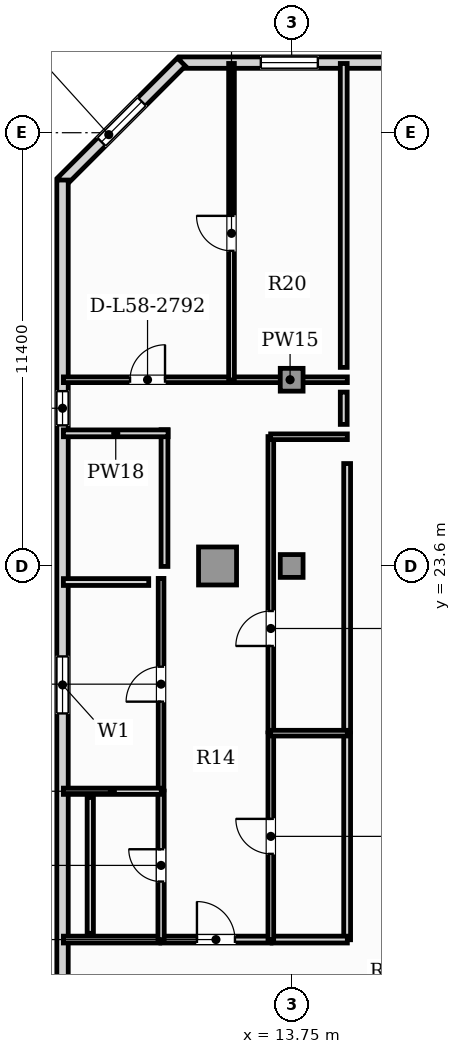
"""IFC4 building model, lengths in metres.
Left out: names, types, materials, properties, quantities, classifications, styles, units other than length and angle.
Written with IfcOpenShell. Run it as: python <this file> out.ifc"""

import sys

from ifc_helpers import new_model, si_unit, direction, frame, frame_2d, origin, origin_2d, place, context, subcontext, project, spatial, rectangle, hollow_rectangle, extrude, element, fill, save


model = new_model("IFC4")
c1 = context("Model", 3, precision=1e-05, world=origin(), true_north=direction((0.0, 1.0)))
c2 = subcontext(c1, "Body", "Model", "MODEL_VIEW")
j1 = project(units=[si_unit("LENGTHUNIT", "METRE"), si_unit("PLANEANGLEUNIT", "RADIAN")], contexts=[c1])
p1 = place(None, origin())
s1 = spatial("IfcSite", under=j1, at=p1, CompositionType="ELEMENT")
p2 = place(p1, origin())
s2 = spatial("IfcBuilding", under=s1, at=p2, CompositionType="ELEMENT")
p3 = place(p2, frame((0.0, 0.0, 234.95)))
s3 = spatial("IfcBuildingStorey", under=s2, at=p3, CompositionType="ELEMENT", Elevation=234.95)
p4 = place(p3, frame((11.8, 23.6, 0.0), z_axis=(0.0, 0.0, 1.0), x_axis=(1.0, 0.0, 0.0)))
e1 = element("IfcColumn", 1, at=p4, inside=s3, PredefinedType="USERDEFINED", context=c2, shape_type="SweptSolid", body=[
    extrude(hollow_rectangle(XDim=1.0, YDim=1.0, WallThickness=0.06, at=origin_2d()), origin(), (0.0, 0.0, 1.0), 3.85),
])
for number, where, z_axis, x_axis in (
    (2, (13.75, 23.6, 0.0), (0.0, 0.0, 1.0), (1.0, 0.0, 0.0)),
    (3, (13.75, 28.5, 0.0), (0.0, 0.0, 1.0), (1.0, 0.0, 0.0)),
):
    element("IfcColumn", number, at=place(p3, frame(where, z_axis=z_axis, x_axis=x_axis)), inside=s3, PredefinedType="COLUMN", context=c2, shape_type="SweptSolid", body=[
        extrude(rectangle(XDim=0.6, YDim=0.6, at=origin_2d()), origin(), (0.0, 0.0, 1.0), 3.85),
    ])
p5 = place(p3, frame((46.689, 36.844, 0.0), z_axis=(0.0, 0.0, 1.0), x_axis=(-1.0, 0.0, 0.0)))
e4 = element("IfcWall", 4, at=p5, inside=s3, PredefinedType="SOLIDWALL", context=c2, shape_type="SweptSolid", body=[
    extrude(rectangle(XDim=35.878, YDim=0.3, at=frame_2d((17.939, 0.0))), origin(), (0.0, 0.0, 1.0), 3.63),
])
p6 = place(p5, frame((32.25, 0.0, 0.9)))
e5 = element("IfcOpeningElement", 5, at=p6, cuts=e4, PredefinedType="OPENING", context=c2, shape_type="SweptSolid", body=[
    extrude(rectangle(XDim=1.5, YDim=1.95, at=frame_2d((0.75, 0.975))), frame((0.0, 0.16, 0.0), z_axis=(0.0, -1.0, 0.0), x_axis=(1.0, 0.0, 0.0)), (0.0, 0.0, 1.0), 0.32),
])
p7 = place(p5, frame((27.205, 0.0, 0.9)))
e6 = element("IfcOpeningElement", 6, at=p7, cuts=e4, PredefinedType="OPENING", context=c2, shape_type="SweptSolid", body=[
    extrude(rectangle(XDim=0.9, YDim=1.4, at=frame_2d((0.45, 0.7))), frame((0.0, 0.16, 0.0), z_axis=(0.0, -1.0, 0.0), x_axis=(1.0, 0.0, 0.0)), (0.0, 0.0, 1.0), 0.32),
])
p8 = place(p5, frame((22.89, 0.0, 0.9)))
e7 = element("IfcOpeningElement", 7, at=p8, cuts=e4, PredefinedType="OPENING", context=c2, shape_type="SweptSolid", body=[
    extrude(rectangle(XDim=1.5, YDim=1.95, at=frame_2d((0.75, 0.975))), frame((0.0, 0.16, 0.0), z_axis=(0.0, -1.0, 0.0), x_axis=(1.0, 0.0, 0.0)), (0.0, 0.0, 1.0), 0.32),
])
p9 = place(p5, frame((19.14, 0.0, 0.9)))
e8 = element("IfcOpeningElement", 8, at=p9, cuts=e4, PredefinedType="OPENING", context=c2, shape_type="SweptSolid", body=[
    extrude(rectangle(XDim=1.5, YDim=1.95, at=frame_2d((0.75, 0.975))), frame((0.0, 0.16, 0.0), z_axis=(0.0, -1.0, 0.0), x_axis=(1.0, 0.0, 0.0)), (0.0, 0.0, 1.0), 0.32),
])
p10 = place(p5, frame((15.216, 0.0, 0.9)))
e9 = element("IfcOpeningElement", 9, at=p10, cuts=e4, PredefinedType="OPENING", context=c2, shape_type="SweptSolid", body=[
    extrude(rectangle(XDim=1.5, YDim=1.95, at=frame_2d((0.75, 0.975))), frame((0.0, 0.16, 0.0), z_axis=(0.0, -1.0, 0.0), x_axis=(1.0, 0.0, 0.0)), (0.0, 0.0, 1.0), 0.32),
])
p11 = place(p5, frame((10.82, 0.0, 0.9)))
e10 = element("IfcOpeningElement", 10, at=p11, cuts=e4, PredefinedType="OPENING", context=c2, shape_type="SweptSolid", body=[
    extrude(rectangle(XDim=1.5, YDim=1.95, at=frame_2d((0.75, 0.975))), frame((0.0, 0.16, 0.0), z_axis=(0.0, -1.0, 0.0), x_axis=(1.0, 0.0, 0.0)), (0.0, 0.0, 1.0), 0.32),
])
p12 = place(p5, frame((6.463, 0.0, 0.9)))
e11 = element("IfcOpeningElement", 11, at=p12, cuts=e4, PredefinedType="OPENING", context=c2, shape_type="SweptSolid", body=[
    extrude(rectangle(XDim=1.5, YDim=1.95, at=frame_2d((0.75, 0.975))), frame((0.0, 0.16, 0.0), z_axis=(0.0, -1.0, 0.0), x_axis=(1.0, 0.0, 0.0)), (0.0, 0.0, 1.0), 0.32),
])
p13 = place(p5, frame((2.721, 0.0, 0.9)))
e12 = element("IfcOpeningElement", 12, at=p13, cuts=e4, PredefinedType="OPENING", context=c2, shape_type="SweptSolid", body=[
    extrude(rectangle(XDim=1.5, YDim=1.95, at=frame_2d((0.75, 0.975))), frame((0.0, 0.16, 0.0), z_axis=(0.0, -1.0, 0.0), x_axis=(1.0, 0.0, 0.0)), (0.0, 0.0, 1.0), 0.32),
])
p14 = place(p3, frame((10.849, 36.86, 0.0), z_axis=(0.0, 0.0, 1.0), x_axis=(-0.707079321262, -0.707134240044, 0.0)))
e13 = element("IfcWall", 13, at=p14, inside=s3, PredefinedType="SOLIDWALL", context=c2, shape_type="SweptSolid", body=[
    extrude(rectangle(XDim=4.446, YDim=0.3, at=frame_2d((2.223, 0.0))), origin(), (0.0, 0.0, 1.0), 3.63),
])
p15 = place(p14, frame((1.473, 0.0, 0.9)))
e14 = element("IfcOpeningElement", 14, at=p15, cuts=e13, PredefinedType="OPENING", context=c2, shape_type="SweptSolid", body=[
    extrude(rectangle(XDim=1.5, YDim=1.95, at=frame_2d((0.75, 0.975))), frame((0.0, 0.16, 0.0), z_axis=(0.0, -1.0, 0.0), x_axis=(1.0, 0.0, 0.0)), (0.0, 0.0, 1.0), 0.32),
])
p16 = place(p3, frame((7.721, 33.754, 0.0), z_axis=(0.0, 0.0, 1.0), x_axis=(0.0, -1.0, 0.0)))
e15 = element("IfcWall", 15, at=p16, inside=s3, PredefinedType="SOLIDWALL", context=c2, shape_type="SweptSolid", body=[
    extrude(rectangle(XDim=30.514, YDim=0.3, at=frame_2d((15.257, 0.0))), origin(), (0.0, 0.0, 1.0), 3.63),
])
p17 = place(p16, frame((5.554, 0.0, 0.95)))
e16 = element("IfcOpeningElement", 16, at=p17, cuts=e15, PredefinedType="OPENING", context=c2, shape_type="SweptSolid", body=[
    extrude(rectangle(XDim=0.9, YDim=1.5, at=frame_2d((0.45, 0.75))), frame((0.0, 0.16, 0.0), z_axis=(0.0, -1.0, 0.0), x_axis=(1.0, 0.0, 0.0)), (0.0, 0.0, 1.0), 0.32),
])
p18 = place(p16, frame((12.534, 0.0, 0.9)))
e17 = element("IfcOpeningElement", 17, at=p18, cuts=e15, PredefinedType="OPENING", context=c2, shape_type="SweptSolid", body=[
    extrude(rectangle(XDim=1.5, YDim=1.95, at=frame_2d((0.75, 0.975))), frame((0.0, 0.16, 0.0), z_axis=(0.0, -1.0, 0.0), x_axis=(1.0, 0.0, 0.0)), (0.0, 0.0, 1.0), 0.32),
])
p19 = place(p3, frame((10.309, 13.77, 0.0), z_axis=(0.0, 0.0, 1.0), x_axis=(1.0, 0.0, 0.0)))
e18 = element("IfcWall", 18, at=p19, inside=s3, PredefinedType="PARTITIONING", context=c2, shape_type="SweptSolid", body=[
    extrude(rectangle(XDim=2.898, YDim=0.18, at=frame_2d((1.449, 0.0))), origin(), (0.0, 0.0, 1.0), 3.63),
])
p20 = place(p19, frame((0.949, 0.0, 0.0)))
e19 = element("IfcOpeningElement", 19, at=p20, cuts=e18, PredefinedType="OPENING", context=c2, shape_type="SweptSolid", body=[
    extrude(rectangle(XDim=1.0, YDim=2.15, at=frame_2d((0.5, 1.075))), frame((0.0, 0.1, 0.0), z_axis=(0.0, -1.0, 0.0), x_axis=(1.0, 0.0, 0.0)), (0.0, 0.0, 1.0), 0.2),
])
p21 = place(p3, frame((7.744, 13.77, 0.0), z_axis=(0.0, 0.0, 1.0), x_axis=(1.0, 0.0, 0.0)))
e20 = element("IfcWall", 20, at=p21, inside=s3, PredefinedType="PARTITIONING", context=c2, shape_type="SweptSolid", body=[
    extrude(rectangle(XDim=2.535, YDim=0.18, at=frame_2d((1.268, 0.0))), origin(), (0.0, 0.0, 1.0), 3.63),
])
p22 = place(p3, frame((15.21, 13.765, 0.0), z_axis=(0.0, 0.0, 1.0), x_axis=(0.0, 1.0, 0.0)))
e21 = element("IfcWall", 21, at=p22, inside=s3, PredefinedType="PARTITIONING", context=c2, shape_type="SweptSolid", body=[
    extrude(rectangle(XDim=5.441, YDim=0.18, at=frame_2d((2.72, 0.0))), origin(), (0.0, 0.0, 1.0), 3.63),
])
p23 = place(p3, frame((13.237, 13.77, 0.0), z_axis=(0.0, 0.0, 1.0), x_axis=(1.0, 0.0, 0.0)))
e22 = element("IfcWall", 22, at=p23, inside=s3, PredefinedType="PARTITIONING", context=c2, shape_type="SweptSolid", body=[
    extrude(rectangle(XDim=1.978, YDim=0.18, at=frame_2d((0.989, 0.0))), origin(), (0.0, 0.0, 1.0), 3.63),
])
p24 = place(p3, frame((15.21, 19.236, 0.0), z_axis=(0.0, 0.0, 1.0), x_axis=(0.0, 1.0, 0.0)))
e23 = element("IfcWall", 23, at=p24, inside=s3, PredefinedType="PARTITIONING", context=c2, shape_type="SweptSolid", body=[
    extrude(rectangle(XDim=7.059, YDim=0.18, at=frame_2d((3.53, 0.0))), origin(), (0.0, 0.0, 1.0), 3.63),
])
p25 = place(p3, frame((10.314, 13.765, 0.0), z_axis=(0.0, 0.0, 1.0), x_axis=(0.0, 1.0, 0.0)))
e24 = element("IfcWall", 24, at=p25, inside=s3, PredefinedType="PLUMBINGWALL", context=c2, shape_type="SweptSolid", body=[
    extrude(rectangle(XDim=3.913, YDim=0.165, at=frame_2d((1.957, 0.0))), origin(), (0.0, 0.0, 1.0), 3.63),
])
p26 = place(p25, frame((1.531, 0.0, 0.0)))
e25 = element("IfcOpeningElement", 25, at=p26, cuts=e24, PredefinedType="OPENING", context=c2, shape_type="SweptSolid", body=[
    extrude(rectangle(XDim=0.85, YDim=2.1, at=frame_2d((0.425, 1.05))), frame((0.0, 0.093, 0.0), z_axis=(0.0, -1.0, 0.0), x_axis=(1.0, 0.0, 0.0)), (0.0, 0.0, 1.0), 0.185),
])
p27 = place(p3, frame((10.314, 17.708, 0.0), z_axis=(0.0, 0.0, 1.0), x_axis=(0.0, 1.0, 0.0)))
e26 = element("IfcWall", 26, at=p27, inside=s3, PredefinedType="PARTITIONING", context=c2, shape_type="SweptSolid", body=[
    extrude(rectangle(XDim=5.565, YDim=0.15, at=frame_2d((2.782, 0.0))), origin(), (0.0, 0.0, 1.0), 3.63),
])
p28 = place(p27, frame((2.323, 0.0, 0.0)))
e27 = element("IfcOpeningElement", 27, at=p28, cuts=e26, PredefinedType="OPENING", context=c2, shape_type="SweptSolid", body=[
    extrude(rectangle(XDim=0.92, YDim=2.1, at=frame_2d((0.46, 1.05))), frame((0.0, 0.085, 0.0), z_axis=(0.0, -1.0, 0.0), x_axis=(1.0, 0.0, 0.0)), (0.0, 0.0, 1.0), 0.17),
])
p29 = place(p3, frame((13.202, 13.765, 0.0), z_axis=(0.0, 0.0, 1.0), x_axis=(0.0, 1.0, 0.0)))
e28 = element("IfcWall", 28, at=p29, inside=s3, PredefinedType="PARTITIONING", context=c2, shape_type="SweptSolid", body=[
    extrude(rectangle(XDim=5.441, YDim=0.15, at=frame_2d((2.72, 0.0))), origin(), (0.0, 0.0, 1.0), 3.63),
])
p30 = place(p29, frame((2.26, 0.0, 0.0)))
e29 = element("IfcOpeningElement", 29, at=p30, cuts=e28, PredefinedType="OPENING", context=c2, shape_type="SweptSolid", body=[
    extrude(rectangle(XDim=0.92, YDim=2.1, at=frame_2d((0.46, 1.05))), frame((0.0, 0.085, 0.0), z_axis=(0.0, -1.0, 0.0), x_axis=(1.0, 0.0, 0.0)), (0.0, 0.0, 1.0), 0.17),
])
p31 = place(p3, frame((13.202, 19.236, 0.0), z_axis=(0.0, 0.0, 1.0), x_axis=(0.0, 1.0, 0.0)))
e30 = element("IfcWall", 30, at=p31, inside=s3, PredefinedType="PARTITIONING", context=c2, shape_type="SweptSolid", body=[
    extrude(rectangle(XDim=7.769, YDim=0.15, at=frame_2d((3.885, 0.0))), origin(), (0.0, 0.0, 1.0), 3.63),
])
p32 = place(p31, frame((2.259, 0.0, 0.0)))
e31 = element("IfcOpeningElement", 31, at=p32, cuts=e30, PredefinedType="OPENING", context=c2, shape_type="SweptSolid", body=[
    extrude(rectangle(XDim=0.92, YDim=2.1, at=frame_2d((0.46, 1.05))), frame((0.0, 0.085, 0.0), z_axis=(0.0, -1.0, 0.0), x_axis=(1.0, 0.0, 0.0)), (0.0, 0.0, 1.0), 0.17),
])
p33 = place(p3, frame((13.197, 27.0, 0.0), z_axis=(0.0, 0.0, 1.0), x_axis=(1.0, 0.0, 0.0)))
e32 = element("IfcWall", 32, at=p33, inside=s3, PredefinedType="PARTITIONING", context=c2, shape_type="SweptSolid", body=[
    extrude(rectangle(XDim=2.018, YDim=0.15, at=frame_2d((1.009, 0.0))), origin(), (0.0, 0.0, 1.0), 3.63),
])
p34 = place(p3, frame((7.744, 28.5, 0.0), z_axis=(0.0, 0.0, 1.0), x_axis=(1.0, 0.0, 0.0)))
e33 = element("IfcWall", 33, at=p34, inside=s3, PredefinedType="PARTITIONING", context=c2, shape_type="SweptSolid", body=[
    extrude(rectangle(XDim=4.428, YDim=0.15, at=frame_2d((2.214, 0.0))), origin(), (0.0, 0.0, 1.0), 3.63),
])
p35 = place(p34, frame((1.754, 0.0, 0.0)))
e34 = element("IfcOpeningElement", 34, at=p35, cuts=e33, PredefinedType="OPENING", context=c2, shape_type="SweptSolid", body=[
    extrude(rectangle(XDim=0.92, YDim=2.1, at=frame_2d((0.46, 1.05))), frame((0.0, 0.085, 0.0), z_axis=(0.0, -1.0, 0.0), x_axis=(1.0, 0.0, 0.0)), (0.0, 0.0, 1.0), 0.17),
])
p36 = place(p3, frame((12.202, 28.5, 0.0), z_axis=(0.0, 0.0, 1.0), x_axis=(1.0, 0.0, 0.0)))
e35 = element("IfcWall", 35, at=p36, inside=s3, PredefinedType="PARTITIONING", context=c2, shape_type="SweptSolid", body=[
    extrude(rectangle(XDim=3.013, YDim=0.15, at=frame_2d((1.506, 0.0))), origin(), (0.0, 0.0, 1.0), 3.085),
])
p37 = place(p3, frame((7.744, 17.673, 0.0), z_axis=(0.0, 0.0, 1.0), x_axis=(1.0, 0.0, 0.0)))
e36 = element("IfcWall", 36, at=p37, inside=s3, PredefinedType="PLUMBINGWALL", context=c2, shape_type="SweptSolid", body=[
    extrude(rectangle(XDim=2.575, YDim=0.165, at=frame_2d((1.288, 0.0))), origin(), (0.0, 0.0, 1.0), 3.63),
])
p38 = place(p3, frame((13.197, 19.201, 0.0), z_axis=(0.0, 0.0, 1.0), x_axis=(1.0, 0.0, 0.0)))
e37 = element("IfcWall", 37, at=p38, inside=s3, PredefinedType="PARTITIONING", context=c2, shape_type="SweptSolid", body=[
    extrude(rectangle(XDim=2.018, YDim=0.15, at=frame_2d((1.009, 0.0))), origin(), (0.0, 0.0, 1.0), 3.63),
])
p39 = place(p3, frame((12.167, 28.495, 0.0), z_axis=(0.0, 0.0, 1.0), x_axis=(0.0, 1.0, 0.0)))
e38 = element("IfcWall", 38, at=p39, inside=s3, PredefinedType="PARTITIONING", context=c2, shape_type="SweptSolid", body=[
    extrude(rectangle(XDim=8.327, YDim=0.15, at=frame_2d((4.164, 0.0))), origin(), (0.0, 0.0, 1.0), 3.63),
])
p40 = place(p39, frame((3.397, 0.0, 0.0)))
e39 = element("IfcOpeningElement", 39, at=p40, cuts=e38, PredefinedType="OPENING", context=c2, shape_type="SweptSolid", body=[
    extrude(rectangle(XDim=0.92, YDim=2.1, at=frame_2d((0.46, 1.05))), frame((0.0, 0.085, 0.0), z_axis=(0.0, -1.0, 0.0), x_axis=(1.0, 0.0, 0.0)), (0.0, 0.0, 1.0), 0.17),
])
p41 = place(p3, frame((10.404, 23.587, 0.0), z_axis=(0.0, 0.0, 1.0), x_axis=(0.0, 1.0, 0.0)))
e40 = element("IfcWall", 40, at=p41, inside=s3, PredefinedType="PARTITIONING", context=c2, shape_type="SweptSolid", body=[
    extrude(rectangle(XDim=3.598, YDim=0.18, at=frame_2d((1.799, 0.0))), origin(), (0.0, 0.0, 1.0), 3.63),
])
p42 = place(p3, frame((10.499, 27.09, 0.0), z_axis=(0.0, 0.0, 1.0), x_axis=(-1.0, 0.0, 0.0)))
e41 = element("IfcWall", 41, at=p42, inside=s3, PredefinedType="PARTITIONING", context=c2, shape_type="SweptSolid", body=[
    extrude(rectangle(XDim=2.755, YDim=0.18, at=frame_2d((1.378, 0.0))), origin(), (0.0, 0.0, 1.0), 3.63),
])
p43 = place(p3, frame((15.12, 28.175, 0.0), z_axis=(0.0, 0.0, 1.0), x_axis=(0.0, -1.0, 0.0)))
e42 = element("IfcWall", 42, at=p43, inside=s3, PredefinedType="PARTITIONING", context=c2, shape_type="SweptSolid", body=[
    extrude(rectangle(XDim=0.85, YDim=0.18, at=frame_2d((0.425, 0.0))), origin(), (0.0, 0.0, 1.0), 3.63),
])
p44 = place(p3, frame((8.451, 13.935, 0.0), z_axis=(0.0, 0.0, 1.0), x_axis=(0.0, 1.0, 0.0)))
e43 = element("IfcWall", 43, at=p44, inside=s3, PredefinedType="PLUMBINGWALL", context=c2, shape_type="SweptSolid", body=[
    extrude(rectangle(XDim=3.573, YDim=0.165, at=frame_2d((1.786, 0.0))), origin(), (0.0, 0.0, 1.0), 3.63),
])
p45 = place(p3, frame((7.744, 23.177, 0.0), z_axis=(0.0, 0.0, 1.0), x_axis=(1.0, 0.0, 0.0)))
e44 = element("IfcWall", 44, at=p45, inside=s3, PredefinedType="PARTITIONING", context=c2, shape_type="SweptSolid", body=[
    extrude(rectangle(XDim=2.245, YDim=0.18, at=frame_2d((1.123, 0.0))), origin(), (0.0, 0.0, 1.0), 3.63),
])
p46 = place(p3, frame((15.12, 36.822, 0.0), z_axis=(0.0, 0.0, 1.0), x_axis=(0.0, -1.0, 0.0)))
e45 = element("IfcWall", 45, at=p46, inside=s3, PredefinedType="PARTITIONING", context=c2, shape_type="SweptSolid", body=[
    extrude(rectangle(XDim=7.997, YDim=0.18, at=frame_2d((3.999, 0.0))), origin(), (0.0, 0.0, 1.0), 3.63),
])
p47 = place(p17, origin())
e46 = element("IfcWindow", 46, at=p47, inside=s3, PartitioningType="SINGLE_PANEL", PredefinedType="WINDOW", context=c2, shape_type="SweptSolid", body=[
    extrude(rectangle(XDim=0.9, YDim=1.5, at=frame_2d((0.45, 0.75))), frame((0.0, 0.03, 0.0), z_axis=(0.0, -1.0, 0.0), x_axis=(1.0, 0.0, 0.0)), (0.0, 0.0, 1.0), 0.06),
])
fill(e16, e46)
p48 = place(p18, origin())
e47 = element("IfcWindow", 47, at=p48, inside=s3, PartitioningType="SINGLE_PANEL", PredefinedType="WINDOW", context=c2, shape_type="SweptSolid", body=[
    extrude(rectangle(XDim=1.5, YDim=1.95, at=frame_2d((0.75, 0.975))), frame((0.0, 0.03, 0.0), z_axis=(0.0, -1.0, 0.0), x_axis=(1.0, 0.0, 0.0)), (0.0, 0.0, 1.0), 0.06),
])
fill(e17, e47)
p49 = place(p15, origin())
e48 = element("IfcWindow", 48, at=p49, inside=s3, PartitioningType="SINGLE_PANEL", PredefinedType="WINDOW", context=c2, shape_type="SweptSolid", body=[
    extrude(rectangle(XDim=1.5, YDim=1.95, at=frame_2d((0.75, 0.975))), frame((0.0, 0.03, 0.0), z_axis=(0.0, -1.0, 0.0), x_axis=(1.0, 0.0, 0.0)), (0.0, 0.0, 1.0), 0.06),
])
fill(e14, e48)
p50 = place(p6, origin())
e49 = element("IfcWindow", 49, at=p50, inside=s3, PartitioningType="SINGLE_PANEL", PredefinedType="WINDOW", context=c2, shape_type="SweptSolid", body=[
    extrude(rectangle(XDim=1.5, YDim=1.95, at=frame_2d((0.75, 0.975))), frame((0.0, 0.03, 0.0), z_axis=(0.0, -1.0, 0.0), x_axis=(1.0, 0.0, 0.0)), (0.0, 0.0, 1.0), 0.06),
])
fill(e5, e49)
p51 = place(p20, origin())
e50 = element("IfcDoor", 50, at=p51, inside=s3, OperationType="SINGLE_SWING_LEFT", PredefinedType="DOOR", context=c2, shape_type="SweptSolid", body=[
    extrude(rectangle(XDim=1.0, YDim=2.15, at=frame_2d((0.5, 1.075))), frame((0.0, 0.025, 0.0), z_axis=(0.0, -1.0, 0.0), x_axis=(1.0, 0.0, 0.0)), (0.0, 0.0, 1.0), 0.05),
])
fill(e19, e50)
p52 = place(p26, origin())
e51 = element("IfcDoor", 51, at=p52, inside=s3, OperationType="SINGLE_SWING_RIGHT", PredefinedType="DOOR", context=c2, shape_type="SweptSolid", body=[
    extrude(rectangle(XDim=0.85, YDim=2.1, at=frame_2d((0.425, 1.05))), frame((0.0, 0.025, 0.0), z_axis=(0.0, -1.0, 0.0), x_axis=(1.0, 0.0, 0.0)), (0.0, 0.0, 1.0), 0.05),
])
fill(e25, e51)
p53 = place(p28, origin())
e52 = element("IfcDoor", 52, at=p53, inside=s3, OperationType="SINGLE_SWING_LEFT", PredefinedType="DOOR", context=c2, shape_type="SweptSolid", body=[
    extrude(rectangle(XDim=0.92, YDim=2.1, at=frame_2d((0.46, 1.05))), frame((0.0, 0.025, 0.0), z_axis=(0.0, -1.0, 0.0), x_axis=(1.0, 0.0, 0.0)), (0.0, 0.0, 1.0), 0.05),
])
fill(e27, e52)
p54 = place(p30, origin())
e53 = element("IfcDoor", 53, at=p54, inside=s3, OperationType="SINGLE_SWING_RIGHT", PredefinedType="DOOR", context=c2, shape_type="SweptSolid", body=[
    extrude(rectangle(XDim=0.92, YDim=2.1, at=frame_2d((0.46, 1.05))), frame((0.0, 0.025, 0.0), z_axis=(0.0, -1.0, 0.0), x_axis=(1.0, 0.0, 0.0)), (0.0, 0.0, 1.0), 0.05),
])
fill(e29, e53)
p55 = place(p32, origin())
e54 = element("IfcDoor", 54, at=p55, inside=s3, OperationType="SINGLE_SWING_LEFT", PredefinedType="DOOR", context=c2, shape_type="SweptSolid", body=[
    extrude(rectangle(XDim=0.92, YDim=2.1, at=frame_2d((0.46, 1.05))), frame((0.0, 0.025, 0.0), z_axis=(0.0, -1.0, 0.0), x_axis=(1.0, 0.0, 0.0)), (0.0, 0.0, 1.0), 0.05),
])
fill(e31, e54)
p56 = place(p35, origin())
e55 = element("IfcDoor", 55, at=p56, inside=s3, OperationType="SINGLE_SWING_RIGHT", PredefinedType="DOOR", context=c2, shape_type="SweptSolid", body=[
    extrude(rectangle(XDim=0.92, YDim=2.1, at=frame_2d((0.46, 1.05))), frame((0.0, 0.025, 0.0), z_axis=(0.0, -1.0, 0.0), x_axis=(1.0, 0.0, 0.0)), (0.0, 0.0, 1.0), 0.05),
])
fill(e34, e55)
p57 = place(p40, origin())
e56 = element("IfcDoor", 56, at=p57, inside=s3, OperationType="SINGLE_SWING_RIGHT", PredefinedType="DOOR", context=c2, shape_type="SweptSolid", body=[
    extrude(rectangle(XDim=0.92, YDim=2.1, at=frame_2d((0.46, 1.05))), frame((0.0, 0.025, 0.0), z_axis=(0.0, -1.0, 0.0), x_axis=(1.0, 0.0, 0.0)), (0.0, 0.0, 1.0), 0.05),
])
fill(e39, e56)
save(model, sys.argv[1])
